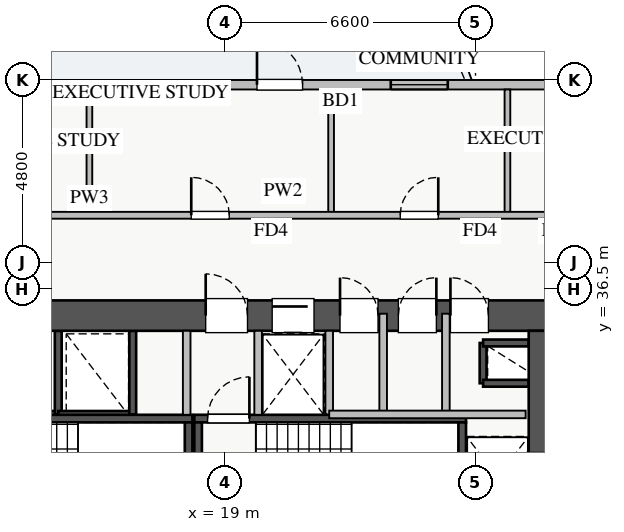
"""IFC4 building model, lengths in metres.
Left out: names, types, materials, properties, quantities, classifications, styles, units other than length and angle.
Written with IfcOpenShell. Run it as: python <this file> out.ifc"""

import sys

from ifc_helpers import new_model, si_unit, direction, frame, frame_2d, origin, place, context, subcontext, project, spatial, rectangle, extrude, source, transform, mapped, element, fill, save


model = new_model("IFC4")
c1 = context("Model", 3, precision=1e-05, world=origin(), true_north=direction((0.0, 1.0)))
c2 = subcontext(c1, "Body", "Model", "MODEL_VIEW")
j1 = project(units=[si_unit("LENGTHUNIT", "METRE"), si_unit("PLANEANGLEUNIT", "RADIAN")], contexts=[c1])
p1 = place(None, origin())
s1 = spatial("IfcSite", under=j1, at=p1, CompositionType="ELEMENT")
p2 = place(p1, origin())
s2 = spatial("IfcBuilding", under=s1, at=p2, CompositionType="ELEMENT")
p3 = place(p2, frame((0.0, 0.0, 39.25)))
s3 = spatial("IfcBuildingStorey", under=s2, at=p3, CompositionType="ELEMENT", Elevation=39.25)
p4 = place(p3, frame((12.68, 33.2, 0.0), z_axis=(0.0, 0.0, 1.0), x_axis=(1.0, 0.0, 0.0)))
e1 = element("IfcWall", 1, at=p4, inside=s3, PredefinedType="SHEAR", context=c2, shape_type="SweptSolid", body=[
    extrude(rectangle(XDim=1.94, YDim=0.18, at=frame_2d((0.97, 0.0))), origin(), (0.0, 0.0, 1.0), 3.07),
])
p5 = place(p3, frame((14.62, 33.2, 0.0), z_axis=(0.0, 0.0, 1.0), x_axis=(0.0, 1.0, 0.0)))
e2 = element("IfcWall", 2, at=p5, inside=s3, PredefinedType="SHEAR", context=c2, shape_type="SweptSolid", body=[
    extrude(rectangle(XDim=2.2, YDim=0.18, at=frame_2d((1.1, 0.0))), origin(), (0.0, 0.0, 1.0), 3.07),
])
p6 = place(p3, frame((25.8, 34.02, 0.0), z_axis=(0.0, 0.0, 1.0), x_axis=(0.0, 1.0, 0.0)))
e3 = element("IfcWall", 3, at=p6, inside=s3, PredefinedType="SHEAR", context=c2, shape_type="SweptSolid", body=[
    extrude(rectangle(XDim=1.06, YDim=0.18, at=frame_2d((0.53, 0.0))), origin(), (0.0, 0.0, 1.0), 3.07),
])
for number, where, z_axis, x_axis in (
    (4, (25.8, 35.08, 0.0), (0.0, 0.0, 1.0), (1.0, 0.0, 0.0)),
    (5, (25.8, 34.02, 0.0), (0.0, 0.0, 1.0), (1.0, 0.0, 0.0)),
):
    element("IfcWall", number, at=place(p3, frame(where, z_axis=z_axis, x_axis=x_axis)), inside=s3, PredefinedType="SHEAR", context=c2, shape_type="SweptSolid", body=[
        extrude(rectangle(XDim=1.2, YDim=0.18, at=frame_2d((0.6, 0.0))), origin(), (0.0, 0.0, 1.0), 3.07),
    ])
p7 = place(p3, frame((14.62, 33.2, 0.0), z_axis=(0.0, 0.0, 1.0), x_axis=(1.0, 0.0, 0.0)))
e6 = element("IfcWall", 6, at=p7, inside=s3, PredefinedType="SHEAR", context=c2, shape_type="SweptSolid", body=[
    extrude(rectangle(XDim=1.96, YDim=0.18, at=frame_2d((0.98, 0.0))), origin(), (0.0, 0.0, 1.0), 3.07),
])
p8 = place(p3, frame((16.58, 33.2, 0.0), z_axis=(0.0, 0.0, 1.0), x_axis=(0.0, 1.0, 0.0)))
e7 = element("IfcWall", 7, at=p8, inside=s3, PredefinedType="SHEAR", context=c2, shape_type="SweptSolid", body=[
    extrude(rectangle(XDim=2.2, YDim=0.18, at=frame_2d((1.1, 0.0))), origin(), (0.0, 0.0, 1.0), 3.07),
])
p9 = place(p3, frame((19.88, 33.2, 0.0), z_axis=(0.0, 0.0, 1.0), x_axis=(1.0, 0.0, 0.0)))
e8 = element("IfcWall", 8, at=p9, inside=s3, PredefinedType="SHEAR", context=c2, shape_type="SweptSolid", body=[
    extrude(rectangle(XDim=1.87, YDim=0.18, at=frame_2d((0.935, 0.0))), origin(), (0.0, 0.0, 1.0), 3.07),
])
p10 = place(p3, frame((11.0, 33.09, 0.0), z_axis=(0.0, 0.0, 1.0), x_axis=(1.0, 0.0, 0.0)))
e9 = element("IfcWall", 9, at=p10, inside=s3, PredefinedType="SHEAR", context=c2, shape_type="SweptSolid", body=[
    extrude(rectangle(XDim=7.15, YDim=0.2, at=frame_2d((3.575, 0.0))), origin(), (0.0, 0.0, 1.0), 3.25),
])
p11 = place(p10, frame((0.35, 0.0, 0.0)))
e10 = element("IfcOpeningElement", 10, at=p11, cuts=e9, PredefinedType="OPENING", context=c2, shape_type="SweptSolid", body=[
    extrude(rectangle(XDim=1.1, YDim=2.05, at=frame_2d((0.55, 1.025))), frame((0.0, 0.11, 0.0), z_axis=(0.0, -1.0, 0.0), x_axis=(1.0, 0.0, 0.0)), (0.0, 0.0, 1.0), 0.22),
])
p12 = place(p3, frame((18.05, 30.05, 0.0), z_axis=(0.0, 0.0, 1.0), x_axis=(0.0, 1.0, 0.0)))
e11 = element("IfcWall", 11, at=p12, inside=s3, PredefinedType="SHEAR", context=c2, shape_type="SweptSolid", body=[
    extrude(rectangle(XDim=2.94, YDim=0.2, at=frame_2d((1.47, 0.0))), origin(), (0.0, 0.0, 1.0), 3.25),
])
p13 = place(p3, frame((18.2, 33.09, 0.0), z_axis=(0.0, 0.0, 1.0), x_axis=(1.0, 0.0, 0.0)))
e12 = element("IfcWall", 12, at=p13, inside=s3, PredefinedType="SHEAR", context=c2, shape_type="SweptSolid", body=[
    extrude(rectangle(XDim=7.15, YDim=0.2, at=frame_2d((3.575, 0.0))), origin(), (0.0, 0.0, 1.0), 3.25),
])
p14 = place(p13, frame((0.35, 0.0, 0.0)))
e13 = element("IfcOpeningElement", 13, at=p14, cuts=e12, PredefinedType="OPENING", context=c2, shape_type="SweptSolid", body=[
    extrude(rectangle(XDim=1.1, YDim=2.05, at=frame_2d((0.55, 1.025))), frame((0.0, 0.11, 0.0), z_axis=(0.0, -1.0, 0.0), x_axis=(1.0, 0.0, 0.0)), (0.0, 0.0, 1.0), 0.22),
])
for number, where, z_axis, x_axis in (
    (14, (18.3, 30.05, 0.0), (0.0, 0.0, 1.0), (0.0, 1.0, 0.0)),
    (15, (25.25, 30.05, 0.0), (0.0, 0.0, 1.0), (0.0, 1.0, 0.0)),
):
    element("IfcWall", number, at=place(p3, frame(where, z_axis=z_axis, x_axis=x_axis)), inside=s3, PredefinedType="SHEAR", context=c2, shape_type="SweptSolid", body=[
        extrude(rectangle(XDim=2.94, YDim=0.2, at=frame_2d((1.47, 0.0))), origin(), (0.0, 0.0, 1.0), 3.25),
    ])
p15 = place(p3, frame((10.2, 35.8, 0.0), z_axis=(0.0, 0.0, 1.0), x_axis=(1.0, 0.0, 0.0)))
e16 = element("IfcWall", 16, at=p15, inside=s3, PredefinedType="SHEAR", context=c2, shape_type="SweptSolid", body=[
    extrude(rectangle(XDim=17.6, YDim=0.8, at=frame_2d((8.8, 0.0))), origin(), (0.0, 0.0, 1.0), 3.25),
])
p16 = place(p15, frame((1.15, 0.0, 0.0)))
e17 = element("IfcOpeningElement", 17, at=p16, cuts=e16, PredefinedType="OPENING", context=c2, shape_type="SweptSolid", body=[
    extrude(rectangle(XDim=1.1, YDim=2.05, at=frame_2d((0.55, 1.025))), frame((0.0, 0.41, 0.0), z_axis=(0.0, -1.0, 0.0), x_axis=(1.0, 0.0, 0.0)), (0.0, 0.0, 1.0), 0.82),
])
p17 = place(p15, frame((8.3, 0.0, 0.0)))
e18 = element("IfcOpeningElement", 18, at=p17, cuts=e16, PredefinedType="OPENING", context=c2, shape_type="SweptSolid", body=[
    extrude(rectangle(XDim=1.1, YDim=2.05, at=frame_2d((0.55, 1.025))), frame((0.0, 0.41, 0.0), z_axis=(0.0, -1.0, 0.0), x_axis=(1.0, 0.0, 0.0)), (0.0, 0.0, 1.0), 0.82),
])
p18 = place(p15, frame((10.05, 0.0, 0.0)))
e19 = element("IfcOpeningElement", 19, at=p18, cuts=e16, PredefinedType="OPENING", context=c2, shape_type="SweptSolid", body=[
    extrude(rectangle(XDim=1.1, YDim=2.05, at=frame_2d((0.55, 1.025))), frame((0.0, 0.41, 0.0), z_axis=(0.0, -1.0, 0.0), x_axis=(1.0, 0.0, 0.0)), (0.0, 0.0, 1.0), 0.82),
])
p19 = place(p15, frame((14.74, 0.0, 0.0)))
e20 = element("IfcOpeningElement", 20, at=p19, cuts=e16, PredefinedType="OPENING", context=c2, shape_type="SweptSolid", body=[
    extrude(rectangle(XDim=1.0, YDim=2.05, at=frame_2d((0.5, 1.025))), frame((0.0, 0.41, 0.0), z_axis=(0.0, -1.0, 0.0), x_axis=(1.0, 0.0, 0.0)), (0.0, 0.0, 1.0), 0.82),
])
p20 = place(p15, frame((11.835, 0.0, 0.0)))
e21 = element("IfcOpeningElement", 21, at=p20, cuts=e16, PredefinedType="OPENING", context=c2, shape_type="SweptSolid", body=[
    extrude(rectangle(XDim=1.0, YDim=2.05, at=frame_2d((0.5, 1.025))), frame((0.0, 0.41, 0.0), z_axis=(0.0, -1.0, 0.0), x_axis=(1.0, 0.0, 0.0)), (0.0, 0.0, 1.0), 0.82),
])
p21 = place(p15, frame((13.37, 0.0, 0.0)))
e22 = element("IfcOpeningElement", 22, at=p21, cuts=e16, PredefinedType="OPENING", context=c2, shape_type="SweptSolid", body=[
    extrude(rectangle(XDim=1.0, YDim=2.05, at=frame_2d((0.5, 1.025))), frame((0.0, 0.41, 0.0), z_axis=(0.0, -1.0, 0.0), x_axis=(1.0, 0.0, 0.0)), (0.0, 0.0, 1.0), 0.82),
])
p22 = place(p3, frame((27.4, 29.8, 0.0), z_axis=(0.0, 0.0, 1.0), x_axis=(0.0, 1.0, 0.0)))
e23 = element("IfcWall", 23, at=p22, inside=s3, PredefinedType="SHEAR", context=c2, shape_type="SweptSolid", body=[
    extrude(rectangle(XDim=5.6, YDim=0.8, at=frame_2d((2.8, 0.0))), origin(), (0.0, 0.0, 1.0), 3.25),
])
p23 = place(p22, frame((1.1, 0.0, 0.0)))
e24 = element("IfcOpeningElement", 24, at=p23, cuts=e23, PredefinedType="OPENING", context=c2, shape_type="SweptSolid", body=[
    extrude(rectangle(XDim=1.3, YDim=2.05, at=frame_2d((0.65, 1.025))), frame((0.0, 0.41, 0.0), z_axis=(0.0, -1.0, 0.0), x_axis=(1.0, 0.0, 0.0)), (0.0, 0.0, 1.0), 0.82),
])
p24 = place(p3, frame((5.45, 41.875, 0.0), z_axis=(0.0, 0.0, 1.0), x_axis=(1.0, 0.0, 0.0)))
e25 = element("IfcWall", 25, at=p24, inside=s3, PredefinedType="STANDARD", context=c2, shape_type="SweptSolid", body=[
    extrude(rectangle(XDim=27.1, YDim=0.25, at=frame_2d((13.55, 0.0))), origin(), (0.0, 0.0, 1.0), 2.61),
])
p25 = place(p24, frame((14.4, 0.0, 0.0)))
e26 = element("IfcOpeningElement", 26, at=p25, cuts=e25, PredefinedType="OPENING", context=c2, shape_type="SweptSolid", body=[
    extrude(rectangle(XDim=1.2, YDim=2.1, at=frame_2d((0.6, 1.05))), frame((0.0, 0.135, 0.0), z_axis=(0.0, -1.0, 0.0), x_axis=(1.0, 0.0, 0.0)), (0.0, 0.0, 1.0), 0.27),
])
p26 = place(p24, frame((1.45, 0.0, 0.9)))
e27 = element("IfcOpeningElement", 27, at=p26, cuts=e25, PredefinedType="OPENING", context=c2, shape_type="SweptSolid", body=[
    extrude(rectangle(XDim=1.5, YDim=1.5, at=frame_2d((0.75, 0.75))), frame((0.0, 0.135, 0.0), z_axis=(0.0, -1.0, 0.0), x_axis=(1.0, 0.0, 0.0)), (0.0, 0.0, 1.0), 0.27),
])
p27 = place(p24, frame((7.82, 0.0, 0.9)))
e28 = element("IfcOpeningElement", 28, at=p27, cuts=e25, PredefinedType="OPENING", context=c2, shape_type="SweptSolid", body=[
    extrude(rectangle(XDim=1.8, YDim=1.5, at=frame_2d((0.9, 0.75))), frame((0.0, 0.135, 0.0), z_axis=(0.0, -1.0, 0.0), x_axis=(1.0, 0.0, 0.0)), (0.0, 0.0, 1.0), 0.27),
])
p28 = place(p24, frame((17.92, 0.0, 0.9)))
e29 = element("IfcOpeningElement", 29, at=p28, cuts=e25, PredefinedType="OPENING", context=c2, shape_type="SweptSolid", body=[
    extrude(rectangle(XDim=1.5, YDim=1.5, at=frame_2d((0.75, 0.75))), frame((0.0, 0.135, 0.0), z_axis=(0.0, -1.0, 0.0), x_axis=(1.0, 0.0, 0.0)), (0.0, 0.0, 1.0), 0.27),
])
p29 = place(p24, frame((22.663, 0.0, 0.9)))
e30 = element("IfcOpeningElement", 30, at=p29, cuts=e25, PredefinedType="OPENING", context=c2, shape_type="SweptSolid", body=[
    extrude(rectangle(XDim=2.1, YDim=1.48, at=frame_2d((1.05, 0.74))), frame((0.0, 0.135, 0.0), z_axis=(0.0, -1.0, 0.0), x_axis=(1.0, 0.0, 0.0)), (0.0, 0.0, 1.0), 0.27),
])
p30 = place(p24, frame((5.084, 0.0, 0.9)))
e31 = element("IfcOpeningElement", 31, at=p30, cuts=e25, PredefinedType="OPENING", context=c2, shape_type="SweptSolid", body=[
    extrude(rectangle(XDim=2.4, YDim=1.5, at=frame_2d((1.2, 0.75))), frame((0.0, 0.135, 0.0), z_axis=(0.0, -1.0, 0.0), x_axis=(1.0, 0.0, 0.0)), (0.0, 0.0, 1.0), 0.27),
])
p31 = place(p24, frame((11.002, 0.0, 0.9)))
e32 = element("IfcOpeningElement", 32, at=p31, cuts=e25, PredefinedType="OPENING", context=c2, shape_type="SweptSolid", body=[
    extrude(rectangle(XDim=2.4, YDim=1.5, at=frame_2d((1.2, 0.75))), frame((0.0, 0.135, 0.0), z_axis=(0.0, -1.0, 0.0), x_axis=(1.0, 0.0, 0.0)), (0.0, 0.0, 1.0), 0.27),
])
for number, where, z_axis, x_axis in (
    (33, (18.0, 33.19, 0.0), (0.0, 0.0, 1.0), (0.0, 1.0, 0.0)),
    (34, (19.88, 33.19, 0.0), (0.0, 0.0, 1.0), (0.0, 1.0, 0.0)),
):
    element("IfcWall", number, at=place(p3, frame(where, z_axis=z_axis, x_axis=x_axis)), inside=s3, PredefinedType="PARTITIONING", context=c2, shape_type="SweptSolid", body=[
        extrude(rectangle(XDim=2.21, YDim=0.2, at=frame_2d((1.105, 0.0))), origin(), (0.0, 0.0, 1.0), 3.07),
    ])
p32 = place(p3, frame((24.82, 33.2, 0.0), z_axis=(0.0, 0.0, 1.0), x_axis=(0.0, 1.0, 0.0)))
e35 = element("IfcWall", 35, at=p32, inside=s3, PredefinedType="PARTITIONING", context=c2, shape_type="SweptSolid", body=[
    extrude(rectangle(XDim=2.65, YDim=0.2, at=frame_2d((1.325, 0.0))), origin(), (0.0, 0.0, 1.0), 3.07),
])
p33 = place(p3, frame((21.75, 33.2, 0.0), z_axis=(0.0, 0.0, 1.0), x_axis=(0.0, 1.0, 0.0)))
e36 = element("IfcWall", 36, at=p33, inside=s3, PredefinedType="PARTITIONING", context=c2, shape_type="SweptSolid", body=[
    extrude(rectangle(XDim=2.2, YDim=0.2, at=frame_2d((1.1, 0.0))), origin(), (0.0, 0.0, 1.0), 3.07),
])
p34 = place(p3, frame((23.17, 33.2, 0.0), z_axis=(0.0, 0.0, 1.0), x_axis=(0.0, 1.0, 0.0)))
e37 = element("IfcWall", 37, at=p34, inside=s3, PredefinedType="PARTITIONING", context=c2, shape_type="SweptSolid", body=[
    extrude(rectangle(XDim=2.65, YDim=0.2, at=frame_2d((1.325, 0.0))), origin(), (0.0, 0.0, 1.0), 3.07),
])
p35 = place(p3, frame((21.75, 33.2, 0.0), z_axis=(0.0, 0.0, 1.0), x_axis=(1.0, 0.0, 0.0)))
e38 = element("IfcWall", 38, at=p35, inside=s3, PredefinedType="PARTITIONING", context=c2, shape_type="SweptSolid", body=[
    extrude(rectangle(XDim=5.17, YDim=0.2, at=frame_2d((2.585, 0.0))), origin(), (0.0, 0.0, 1.0), 3.07),
])
for number, where, z_axis, x_axis in (
    (39, (15.44, 38.44, 0.0), (0.0, 0.0, 1.0), (0.0, 1.0, 0.0)),
    (40, (21.8, 38.44, 0.0), (0.0, 0.0, 1.0), (0.0, 1.0, 0.0)),
    (41, (26.44, 38.44, 0.0), (0.0, 0.0, 1.0), (0.0, 1.0, 0.0)),
):
    element("IfcWall", number, at=place(p3, frame(where, z_axis=z_axis, x_axis=x_axis)), inside=s3, PredefinedType="PARTITIONING", context=c2, shape_type="SweptSolid", body=[
        extrude(rectangle(XDim=3.31, YDim=0.15, at=frame_2d((1.655, 0.0))), origin(), (0.0, 0.0, 1.0), 3.07),
    ])
p36 = place(p3, frame((8.72, 38.44, 0.0), z_axis=(0.0, 0.0, 1.0), x_axis=(1.0, 0.0, 0.0)))
e42 = element("IfcWall", 42, at=p36, inside=s3, PredefinedType="PARTITIONING", context=c2, shape_type="SweptSolid", body=[
    extrude(rectangle(XDim=23.63, YDim=0.18, at=frame_2d((11.815, 0.0))), origin(), (0.0, 0.0, 1.0), 3.07),
])
p37 = place(p36, frame((2.86, 0.0, 0.0)))
e43 = element("IfcOpeningElement", 43, at=p37, cuts=e42, PredefinedType="OPENING", context=c2, shape_type="SweptSolid", body=[
    extrude(rectangle(XDim=1.0, YDim=2.05, at=frame_2d((0.5, 1.025))), frame((0.0, 0.1, 0.0), z_axis=(0.0, -1.0, 0.0), x_axis=(1.0, 0.0, 0.0)), (0.0, 0.0, 1.0), 0.2),
])
p38 = place(p36, frame((9.4, 0.0, 0.0)))
e44 = element("IfcOpeningElement", 44, at=p38, cuts=e42, PredefinedType="OPENING", context=c2, shape_type="SweptSolid", body=[
    extrude(rectangle(XDim=1.0, YDim=2.05, at=frame_2d((0.5, 1.025))), frame((0.0, 0.1, 0.0), z_axis=(0.0, -1.0, 0.0), x_axis=(1.0, 0.0, 0.0)), (0.0, 0.0, 1.0), 0.2),
])
p39 = place(p36, frame((14.9, 0.0, 0.0)))
e45 = element("IfcOpeningElement", 45, at=p39, cuts=e42, PredefinedType="OPENING", context=c2, shape_type="SweptSolid", body=[
    extrude(rectangle(XDim=1.0, YDim=2.05, at=frame_2d((0.5, 1.025))), frame((0.0, 0.1, 0.0), z_axis=(0.0, -1.0, 0.0), x_axis=(1.0, 0.0, 0.0)), (0.0, 0.0, 1.0), 0.2),
])
p40 = place(p36, frame((20.175, 0.0, 0.0)))
e46 = element("IfcOpeningElement", 46, at=p40, cuts=e42, PredefinedType="OPENING", context=c2, shape_type="SweptSolid", body=[
    extrude(rectangle(XDim=1.0, YDim=2.05, at=frame_2d((0.5, 1.025))), frame((0.0, 0.1, 0.0), z_axis=(0.0, -1.0, 0.0), x_axis=(1.0, 0.0, 0.0)), (0.0, 0.0, 1.0), 0.2),
])
m1 = source(origin(), c2, "Body", "SweptSolid", [
    extrude(rectangle(XDim=1.2, YDim=2.1, at=frame_2d((0.6, 1.05))), frame((0.0, 0.025, 0.0), z_axis=(0.0, -1.0, 0.0), x_axis=(1.0, 0.0, 0.0)), (0.0, 0.0, 1.0), 0.05),
])
p41 = place(p25, origin())
e47 = element("IfcDoor", 47, at=p41, inside=s3, OperationType="SINGLE_SWING_LEFT", PredefinedType="DOOR", context=c2, shape_type="MappedRepresentation", body=[
    mapped(m1, transform((0.0, 0.0, 0.0), x_axis=(1.0, 0.0, 0.0), y_axis=(0.0, 1.0, 0.0), z_axis=(0.0, 0.0, 1.0), scale=1.0)),
])
fill(e26, e47)
m2 = source(origin(), c2, "Body", "SweptSolid", [
    extrude(rectangle(XDim=1.8, YDim=1.5, at=frame_2d((0.9, 0.75))), frame((0.0, 0.03, 0.0), z_axis=(0.0, -1.0, 0.0), x_axis=(1.0, 0.0, 0.0)), (0.0, 0.0, 1.0), 0.06),
])
p42 = place(p27, origin())
e48 = element("IfcWindow", 48, at=p42, inside=s3, PartitioningType="DOUBLE_PANEL_VERTICAL", PredefinedType="WINDOW", context=c2, shape_type="MappedRepresentation", body=[
    mapped(m2, transform((0.0, 0.0, 0.0), x_axis=(1.0, 0.0, 0.0), y_axis=(0.0, 1.0, 0.0), z_axis=(0.0, 0.0, 1.0), scale=1.0)),
])
fill(e28, e48)
m3 = source(origin(), c2, "Body", "SweptSolid", [
    extrude(rectangle(XDim=1.5, YDim=1.5, at=frame_2d((0.75, 0.75))), frame((0.0, 0.03, 0.0), z_axis=(0.0, -1.0, 0.0), x_axis=(1.0, 0.0, 0.0)), (0.0, 0.0, 1.0), 0.06),
])
p43 = place(p28, origin())
e49 = element("IfcWindow", 49, at=p43, inside=s3, PartitioningType="DOUBLE_PANEL_VERTICAL", PredefinedType="WINDOW", context=c2, shape_type="MappedRepresentation", body=[
    mapped(m3, transform((0.0, 0.0, 0.0), x_axis=(1.0, 0.0, 0.0), y_axis=(0.0, 1.0, 0.0), z_axis=(0.0, 0.0, 1.0), scale=1.0)),
])
fill(e29, e49)
m4 = source(origin(), c2, "Body", "SweptSolid", [
    extrude(rectangle(XDim=1.3, YDim=2.05, at=frame_2d((0.65, 1.025))), frame((0.0, 0.025, 0.0), z_axis=(0.0, -1.0, 0.0), x_axis=(1.0, 0.0, 0.0)), (0.0, 0.0, 1.0), 0.05),
])
p44 = place(p23, origin())
e50 = element("IfcDoor", 50, at=p44, inside=s3, OperationType="SLIDING_TO_LEFT", PredefinedType="DOOR", context=c2, shape_type="MappedRepresentation", body=[
    mapped(m4, transform((0.0, 0.0, 0.0), x_axis=(1.0, 0.0, 0.0), y_axis=(0.0, 1.0, 0.0), z_axis=(0.0, 0.0, 1.0), scale=1.0)),
])
fill(e24, e50)
m5 = source(origin(), c2, "Body", "SweptSolid", [
    extrude(rectangle(XDim=1.1, YDim=2.05, at=frame_2d((0.55, 1.025))), frame((0.0, 0.025, 0.0), z_axis=(0.0, -1.0, 0.0), x_axis=(1.0, 0.0, 0.0)), (0.0, 0.0, 1.0), 0.05),
])
p45 = place(p17, origin())
e51 = element("IfcDoor", 51, at=p45, inside=s3, OperationType="SINGLE_SWING_LEFT", PredefinedType="DOOR", context=c2, shape_type="MappedRepresentation", body=[
    mapped(m5, transform((0.0, 0.0, 0.0), x_axis=(1.0, 0.0, 0.0), y_axis=(0.0, 1.0, 0.0), z_axis=(0.0, 0.0, 1.0), scale=1.0)),
])
fill(e18, e51)
p46 = place(p14, origin())
e52 = element("IfcDoor", 52, at=p46, inside=s3, OperationType="SINGLE_SWING_RIGHT", PredefinedType="DOOR", context=c2, shape_type="MappedRepresentation", body=[
    mapped(m5, transform((0.0, 0.0, 0.0), x_axis=(1.0, 0.0, 0.0), y_axis=(0.0, 1.0, 0.0), z_axis=(0.0, 0.0, 1.0), scale=1.0)),
])
fill(e13, e52)
p47 = place(p18, origin())
e53 = element("IfcDoor", 53, at=p47, inside=s3, OperationType="SLIDING_TO_LEFT", PredefinedType="DOOR", context=c2, shape_type="MappedRepresentation", body=[
    mapped(m5, transform((0.0, 0.0, 0.0), x_axis=(1.0, 0.0, 0.0), y_axis=(0.0, 1.0, 0.0), z_axis=(0.0, 0.0, 1.0), scale=1.0)),
])
fill(e19, e53)
m6 = source(origin(), c2, "Body", "SweptSolid", [
    extrude(rectangle(XDim=1.0, YDim=2.05, at=frame_2d((0.5, 1.025))), frame((0.0, 0.025, 0.0), z_axis=(0.0, -1.0, 0.0), x_axis=(1.0, 0.0, 0.0)), (0.0, 0.0, 1.0), 0.05),
])
p48 = place(p19, origin())
e54 = element("IfcDoor", 54, at=p48, inside=s3, OperationType="SINGLE_SWING_LEFT", PredefinedType="DOOR", context=c2, shape_type="MappedRepresentation", body=[
    mapped(m6, transform((0.0, 0.0, 0.0), x_axis=(1.0, 0.0, 0.0), y_axis=(0.0, 1.0, 0.0), z_axis=(0.0, 0.0, 1.0), scale=1.0)),
])
fill(e20, e54)
p49 = place(p20, origin())
e55 = element("IfcDoor", 55, at=p49, inside=s3, OperationType="SINGLE_SWING_LEFT", PredefinedType="DOOR", context=c2, shape_type="MappedRepresentation", body=[
    mapped(m6, transform((0.0, 0.0, 0.0), x_axis=(1.0, 0.0, 0.0), y_axis=(0.0, 1.0, 0.0), z_axis=(0.0, 0.0, 1.0), scale=1.0)),
])
fill(e21, e55)
p50 = place(p21, origin())
e56 = element("IfcDoor", 56, at=p50, inside=s3, OperationType="SINGLE_SWING_RIGHT", PredefinedType="DOOR", context=c2, shape_type="MappedRepresentation", body=[
    mapped(m6, transform((0.0, 0.0, 0.0), x_axis=(1.0, 0.0, 0.0), y_axis=(0.0, 1.0, 0.0), z_axis=(0.0, 0.0, 1.0), scale=1.0)),
])
fill(e22, e56)
p51 = place(p38, origin())
e57 = element("IfcDoor", 57, at=p51, inside=s3, OperationType="SINGLE_SWING_LEFT", PredefinedType="DOOR", context=c2, shape_type="MappedRepresentation", body=[
    mapped(m6, transform((0.0, 0.0, 0.0), x_axis=(1.0, 0.0, 0.0), y_axis=(0.0, 1.0, 0.0), z_axis=(0.0, 0.0, 1.0), scale=1.0)),
])
fill(e44, e57)
p52 = place(p39, origin())
e58 = element("IfcDoor", 58, at=p52, inside=s3, OperationType="SINGLE_SWING_RIGHT", PredefinedType="DOOR", context=c2, shape_type="MappedRepresentation", body=[
    mapped(m6, transform((0.0, 0.0, 0.0), x_axis=(1.0, 0.0, 0.0), y_axis=(0.0, 1.0, 0.0), z_axis=(0.0, 0.0, 1.0), scale=1.0)),
])
fill(e45, e58)
m7 = source(origin(), c2, "Body", "SweptSolid", [
    extrude(rectangle(XDim=2.4, YDim=1.5, at=frame_2d((1.2, 0.75))), frame((0.0, 0.03, 0.0), z_axis=(0.0, -1.0, 0.0), x_axis=(1.0, 0.0, 0.0)), (0.0, 0.0, 1.0), 0.06),
])
p53 = place(p31, origin())
e59 = element("IfcWindow", 59, at=p53, inside=s3, PartitioningType="TRIPLE_PANEL_VERTICAL", PredefinedType="WINDOW", context=c2, shape_type="MappedRepresentation", body=[
    mapped(m7, transform((0.0, 0.0, 0.0), x_axis=(1.0, 0.0, 0.0), y_axis=(0.0, 1.0, 0.0), z_axis=(0.0, 0.0, 1.0), scale=1.0)),
])
fill(e32, e59)
save(model, sys.argv[1])
